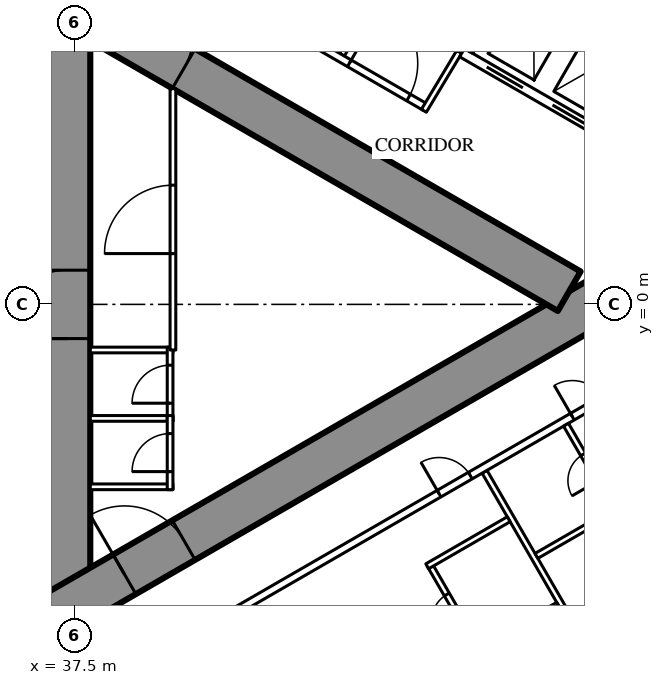
"""IFC4 building model, lengths in metres.
Left out: names, types, materials, properties, quantities, classifications, styles, units other than length and angle.
Written with IfcOpenShell. Run it as: python <this file> out.ifc"""

import sys

from ifc_helpers import new_model, si_unit, direction, frame, frame_2d, origin, place, context, subcontext, project, spatial, rectangle, extrude, element, fill, save


model = new_model("IFC4")
c1 = context("Model", 3, precision=1e-05, world=origin(), true_north=direction((0.0, 1.0)))
c2 = subcontext(c1, "Body", "Model", "MODEL_VIEW")
j1 = project(units=[si_unit("LENGTHUNIT", "METRE"), si_unit("PLANEANGLEUNIT", "RADIAN")], contexts=[c1])
p1 = place(None, origin())
s1 = spatial("IfcSite", under=j1, at=p1, CompositionType="ELEMENT")
p2 = place(p1, origin())
s2 = spatial("IfcBuilding", under=s1, at=p2, CompositionType="ELEMENT")
p3 = place(p2, frame((0.0, 0.0, 163.3)))
s3 = spatial("IfcBuildingStorey", under=s2, at=p3, CompositionType="ELEMENT", Elevation=163.3)
p4 = place(p3, frame((37.3, -8.6, 0.0), z_axis=(0.0, 0.0, 1.0), x_axis=(0.0, 1.0, 0.0)))
e1 = element("IfcWall", 1, at=p4, inside=s3, PredefinedType="SHEAR", context=c2, shape_type="SweptSolid", body=[
    extrude(rectangle(XDim=17.2, YDim=1.2, at=frame_2d((8.6, 0.0))), origin(), (0.0, 0.0, 1.0), 3.5),
])
p5 = place(p4, frame((7.7, 0.0, 0.0)))
e2 = element("IfcOpeningElement", 2, at=p5, cuts=e1, PredefinedType="OPENING", context=c2, shape_type="SweptSolid", body=[
    extrude(rectangle(XDim=1.8, YDim=2.2, at=frame_2d((0.9, 1.1))), frame((0.0, 0.61, 0.0), z_axis=(0.0, -1.0, 0.0), x_axis=(1.0, 0.0, 0.0)), (0.0, 0.0, 1.0), 1.22),
])
p6 = place(p3, frame((27.2, -13.8, 0.0), z_axis=(0.0, 0.0, 1.0), x_axis=(0.866027159892, 0.499996958321, 0.0)))
e3 = element("IfcWall", 3, at=p6, inside=s3, PredefinedType="SHEAR", context=c2, shape_type="SweptSolid", body=[
    extrude(rectangle(XDim=27.947, YDim=1.2, at=frame_2d((13.973, 0.0))), origin(), (0.0, 0.0, 1.0), 3.5),
])
p7 = place(p6, frame((4.6, 0.0, 0.0)))
e4 = element("IfcOpeningElement", 4, at=p7, cuts=e3, PredefinedType="OPENING", context=c2, shape_type="SweptSolid", body=[
    extrude(rectangle(XDim=1.0, YDim=2.2, at=frame_2d((0.5, 1.1))), frame((0.0, 0.61, 0.0), z_axis=(0.0, -1.0, 0.0), x_axis=(1.0, 0.0, 0.0)), (0.0, 0.0, 1.0), 1.22),
])
p8 = place(p6, frame((13.395, 0.0, 0.0)))
e5 = element("IfcOpeningElement", 5, at=p8, cuts=e3, PredefinedType="OPENING", context=c2, shape_type="SweptSolid", body=[
    extrude(rectangle(XDim=1.8, YDim=2.2, at=frame_2d((0.9, 1.1))), frame((0.0, 0.61, 0.0), z_axis=(0.0, -1.0, 0.0), x_axis=(1.0, 0.0, 0.0)), (0.0, 0.0, 1.0), 1.22),
])
p9 = place(p3, frame((27.2, 13.8, 0.0), z_axis=(0.0, 0.0, 1.0), x_axis=(0.866024515034, -0.500001539357, 0.0)))
e6 = element("IfcWall", 6, at=p9, inside=s3, PredefinedType="SHEAR", context=c2, shape_type="SweptSolid", body=[
    extrude(rectangle(XDim=26.907, YDim=1.2, at=frame_2d((13.454, 0.0))), origin(), (0.0, 0.0, 1.0), 3.5),
])
p10 = place(p9, frame((4.6, 0.0, 0.0)))
e7 = element("IfcOpeningElement", 7, at=p10, cuts=e6, PredefinedType="OPENING", context=c2, shape_type="SweptSolid", body=[
    extrude(rectangle(XDim=1.0, YDim=2.2, at=frame_2d((0.5, 1.1))), frame((0.0, 0.61, 0.0), z_axis=(0.0, -1.0, 0.0), x_axis=(1.0, 0.0, 0.0)), (0.0, 0.0, 1.0), 1.22),
])
p11 = place(p9, frame((13.395, 0.0, 0.0)))
e8 = element("IfcOpeningElement", 8, at=p11, cuts=e6, PredefinedType="OPENING", context=c2, shape_type="SweptSolid", body=[
    extrude(rectangle(XDim=1.8, YDim=2.2, at=frame_2d((0.9, 1.1))), frame((0.0, 0.61, 0.0), z_axis=(0.0, -1.0, 0.0), x_axis=(1.0, 0.0, 0.0)), (0.0, 0.0, 1.0), 1.22),
])
p12 = place(p3, frame((48.275, -4.404, 0.0), z_axis=(0.0, 0.0, 1.0), x_axis=(0.500006004368, -0.866021937133, 0.0)))
e9 = element("IfcWall", 9, at=p12, inside=s3, PredefinedType="PARTITIONING", context=c2, shape_type="SweptSolid", body=[
    extrude(rectangle(XDim=7.279, YDim=0.15, at=frame_2d((3.64, 0.0))), origin(), (0.0, 0.0, 1.0), 2.3),
])
p13 = place(p3, frame((44.521, 6.571, 0.0), z_axis=(0.0, 0.0, 1.0), x_axis=(0.500020376429, 0.866013639128, 0.0)))
e10 = element("IfcWall", 10, at=p13, inside=s3, PredefinedType="PARTITIONING", context=c2, shape_type="SweptSolid", body=[
    extrude(rectangle(XDim=7.306, YDim=0.15, at=frame_2d((3.653, 0.0))), origin(), (0.0, 0.0, 1.0), 2.3),
])
p14 = place(p3, frame((27.959, 16.017, 0.0), z_axis=(0.0, 0.0, 1.0), x_axis=(0.866027146794, -0.499996981007, 0.0)))
e11 = element("IfcWall", 11, at=p14, inside=s3, PredefinedType="PARTITIONING", context=c2, shape_type="SweptSolid", body=[
    extrude(rectangle(XDim=21.657, YDim=0.2, at=frame_2d((10.829, 0.0))), origin(), (0.0, 0.0, 1.0), 3.25),
])
p15 = place(p14, frame((15.391, 0.0, 0.0)))
e12 = element("IfcOpeningElement", 12, at=p15, cuts=e11, PredefinedType="OPENING", context=c2, shape_type="SweptSolid", body=[
    extrude(rectangle(XDim=0.95, YDim=2.2, at=frame_2d((0.475, 1.1))), frame((0.0, 0.11, 0.0), z_axis=(0.0, -1.0, 0.0), x_axis=(1.0, 0.0, 0.0)), (0.0, 0.0, 1.0), 0.22),
])
p16 = place(p14, frame((13.409, 0.0, 0.0)))
e13 = element("IfcOpeningElement", 13, at=p16, cuts=e11, PredefinedType="OPENING", context=c2, shape_type="SweptSolid", body=[
    extrude(rectangle(XDim=0.95, YDim=2.2, at=frame_2d((0.475, 1.1))), frame((0.0, 0.11, 0.0), z_axis=(0.0, -1.0, 0.0), x_axis=(1.0, 0.0, 0.0)), (0.0, 0.0, 1.0), 0.22),
])
p17 = place(p14, frame((0.6, 0.0, 0.0)))
e14 = element("IfcOpeningElement", 14, at=p17, cuts=e11, PredefinedType="OPENING", context=c2, shape_type="SweptSolid", body=[
    extrude(rectangle(XDim=0.95, YDim=2.2, at=frame_2d((0.475, 1.1))), frame((0.0, 0.11, 0.0), z_axis=(0.0, -1.0, 0.0), x_axis=(1.0, 0.0, 0.0)), (0.0, 0.0, 1.0), 0.22),
])
p18 = place(p14, frame((19.349, 0.0, 0.0)))
e15 = element("IfcOpeningElement", 15, at=p18, cuts=e11, PredefinedType="OPENING", context=c2, shape_type="SweptSolid", body=[
    extrude(rectangle(XDim=1.8, YDim=2.2, at=frame_2d((0.9, 1.1))), frame((0.0, 0.11, 0.0), z_axis=(0.0, -1.0, 0.0), x_axis=(1.0, 0.0, 0.0)), (0.0, 0.0, 1.0), 0.22),
])
p19 = place(p3, frame((47.606, 6.643, 0.0), z_axis=(0.0, 0.0, 1.0), x_axis=(-0.514237157483, -0.857648031458, 0.0)))
e16 = element("IfcWall", 16, at=p19, inside=s3, PredefinedType="PARTITIONING", context=c2, shape_type="SweptSolid", body=[
    extrude(rectangle(XDim=1.805, YDim=0.15, at=frame_2d((0.902, 0.0))), origin(), (0.0, 0.0, 1.0), 3.25),
])
p20 = place(p3, frame((40.741, -8.638, 0.0), z_axis=(0.0, 0.0, 1.0), x_axis=(0.866022967338, 0.500004220025, 0.0)))
e17 = element("IfcWall", 17, at=p20, inside=s3, PredefinedType="PARTITIONING", context=c2, shape_type="SweptSolid", body=[
    extrude(rectangle(XDim=17.276, YDim=0.2, at=frame_2d((8.638, 0.0))), origin(), (0.0, 0.0, 1.0), 3.25),
])
p21 = place(p20, frame((7.316, 0.0, 0.0)))
e18 = element("IfcOpeningElement", 18, at=p21, cuts=e17, PredefinedType="OPENING", context=c2, shape_type="SweptSolid", body=[
    extrude(rectangle(XDim=0.95, YDim=2.2, at=frame_2d((0.475, 1.1))), frame((0.0, 0.11, 0.0), z_axis=(0.0, -1.0, 0.0), x_axis=(1.0, 0.0, 0.0)), (0.0, 0.0, 1.0), 0.22),
])
p22 = place(p20, frame((11.366, 0.0, 0.0)))
e19 = element("IfcOpeningElement", 19, at=p22, cuts=e17, PredefinedType="OPENING", context=c2, shape_type="SweptSolid", body=[
    extrude(rectangle(XDim=0.95, YDim=2.2, at=frame_2d((0.475, 1.1))), frame((0.0, 0.11, 0.0), z_axis=(0.0, -1.0, 0.0), x_axis=(1.0, 0.0, 0.0)), (0.0, 0.0, 1.0), 0.22),
])
p23 = place(p20, frame((13.347, 0.0, 0.0)))
e20 = element("IfcOpeningElement", 20, at=p23, cuts=e17, PredefinedType="OPENING", context=c2, shape_type="SweptSolid", body=[
    extrude(rectangle(XDim=0.95, YDim=2.2, at=frame_2d((0.475, 1.1))), frame((0.0, 0.11, 0.0), z_axis=(0.0, -1.0, 0.0), x_axis=(1.0, 0.0, 0.0)), (0.0, 0.0, 1.0), 0.22),
])
p24 = place(p3, frame((48.066, -9.143, 0.0), z_axis=(0.0, 0.0, 1.0), x_axis=(0.866006523861, 0.500032699561, 0.0)))
e21 = element("IfcWall", 21, at=p24, inside=s3, PredefinedType="PARTITIONING", context=c2, shape_type="SweptSolid", body=[
    extrude(rectangle(XDim=2.475, YDim=0.15, at=frame_2d((1.237, 0.0))), origin(), (0.0, 0.0, 1.0), 3.25),
])
p25 = place(p3, frame((46.831, -6.854, 0.0), z_axis=(0.0, 0.0, 1.0), x_axis=(0.500006934395, -0.866021400173, 0.0)))
e22 = element("IfcWall", 22, at=p25, inside=s3, PredefinedType="PARTITIONING", context=c2, shape_type="SweptSolid", body=[
    extrude(rectangle(XDim=2.6, YDim=0.15, at=frame_2d((1.3, 0.0))), origin(), (0.0, 0.0, 1.0), 3.25),
])
p26 = place(p25, frame((0.9, 0.0, 0.0)))
e23 = element("IfcOpeningElement", 23, at=p26, cuts=e22, PredefinedType="OPENING", context=c2, shape_type="SweptSolid", body=[
    extrude(rectangle(XDim=0.8, YDim=2.2, at=frame_2d((0.4, 1.1))), frame((0.0, 0.085, 0.0), z_axis=(0.0, -1.0, 0.0), x_axis=(1.0, 0.0, 0.0)), (0.0, 0.0, 1.0), 0.17),
])
for number, where, z_axis, x_axis in (
    (24, (46.766, -6.891, 0.0), (0.0, 0.0, 1.0), (0.866, 0.5, 0.0)),
    (25, (49.64, -6.618, 0.0), (0.0, 0.0, 1.0), (0.866, 0.5, 0.0)),
):
    element("IfcWall", number, at=place(p3, frame(where, z_axis=z_axis, x_axis=x_axis)), inside=s3, PredefinedType="PARTITIONING", context=c2, shape_type="SweptSolid", body=[
        extrude(rectangle(XDim=2.475, YDim=0.15, at=frame_2d((1.237, 0.0))), origin(), (0.0, 0.0, 1.0), 3.25),
    ])
p27 = place(p3, frame((50.418, -3.166, 0.0), z_axis=(0.0, 0.0, 1.0), x_axis=(0.499936506574, -0.866062058628, 0.0)))
e26 = element("IfcWall", 26, at=p27, inside=s3, PredefinedType="PARTITIONING", context=c2, shape_type="SweptSolid", body=[
    extrude(rectangle(XDim=2.6, YDim=0.15, at=frame_2d((1.3, 0.0))), origin(), (0.0, 0.0, 1.0), 3.25),
])
p28 = place(p27, frame((0.9, 0.0, 0.0)))
e27 = element("IfcOpeningElement", 27, at=p28, cuts=e26, PredefinedType="OPENING", context=c2, shape_type="SweptSolid", body=[
    extrude(rectangle(XDim=0.8, YDim=2.2, at=frame_2d((0.4, 1.1))), frame((0.0, 0.085, 0.0), z_axis=(0.0, -1.0, 0.0), x_axis=(1.0, 0.0, 0.0)), (0.0, 0.0, 1.0), 0.17),
])
for number, where, z_axis, x_axis in (
    (28, (37.9, -1.2, 0.0), (0.0, 0.0, 1.0), (1.0, 0.0, 0.0)),
    (29, (37.9, -3.0, 0.0), (0.0, 0.0, 1.0), (1.0, 0.0, 0.0)),
    (30, (37.9, -4.8, 0.0), (0.0, 0.0, 1.0), (1.0, 0.0, 0.0)),
):
    element("IfcWall", number, at=place(p3, frame(where, z_axis=z_axis, x_axis=x_axis)), inside=s3, PredefinedType="PARTITIONING", context=c2, shape_type="SweptSolid", body=[
        extrude(rectangle(XDim=2.175, YDim=0.15, at=frame_2d((1.087, 0.0))), origin(), (0.0, 0.0, 1.0), 3.25),
    ])
p29 = place(p3, frame((40.0, -3.075, 0.0), z_axis=(0.0, 0.0, 1.0), x_axis=(0.0, 1.0, 0.0)))
e31 = element("IfcWall", 31, at=p29, inside=s3, PredefinedType="PARTITIONING", context=c2, shape_type="SweptSolid", body=[
    extrude(rectangle(XDim=1.95, YDim=0.15, at=frame_2d((0.975, 0.0))), origin(), (0.0, 0.0, 1.0), 3.25),
])
p30 = place(p29, frame((0.475, 0.0, 0.0)))
e32 = element("IfcOpeningElement", 32, at=p30, cuts=e31, PredefinedType="OPENING", context=c2, shape_type="SweptSolid", body=[
    extrude(rectangle(XDim=1.0, YDim=2.2, at=frame_2d((0.5, 1.1))), frame((0.0, 0.085, 0.0), z_axis=(0.0, -1.0, 0.0), x_axis=(1.0, 0.0, 0.0)), (0.0, 0.0, 1.0), 0.17),
])
p31 = place(p3, frame((40.0, -4.875, 0.0), z_axis=(0.0, 0.0, 1.0), x_axis=(0.0, 1.0, 0.0)))
e33 = element("IfcWall", 33, at=p31, inside=s3, PredefinedType="PARTITIONING", context=c2, shape_type="SweptSolid", body=[
    extrude(rectangle(XDim=1.95, YDim=0.15, at=frame_2d((0.975, 0.0))), origin(), (0.0, 0.0, 1.0), 3.25),
])
p32 = place(p31, frame((0.475, 0.0, 0.0)))
e34 = element("IfcOpeningElement", 34, at=p32, cuts=e33, PredefinedType="OPENING", context=c2, shape_type="SweptSolid", body=[
    extrude(rectangle(XDim=1.0, YDim=2.2, at=frame_2d((0.5, 1.1))), frame((0.0, 0.085, 0.0), z_axis=(0.0, -1.0, 0.0), x_axis=(1.0, 0.0, 0.0)), (0.0, 0.0, 1.0), 0.17),
])
p33 = place(p3, frame((40.075, -1.2, 0.0), z_axis=(0.0, 0.0, 1.0), x_axis=(0.0, 1.0, 0.0)))
e35 = element("IfcWall", 35, at=p33, inside=s3, PredefinedType="PARTITIONING", context=c2, shape_type="SweptSolid", body=[
    extrude(rectangle(XDim=6.874, YDim=0.15, at=frame_2d((3.437, 0.0))), origin(), (0.0, 0.0, 1.0), 3.25),
])
p34 = place(p33, frame((2.537, 0.0, 0.0)))
e36 = element("IfcOpeningElement", 36, at=p34, cuts=e35, PredefinedType="OPENING", context=c2, shape_type="SweptSolid", body=[
    extrude(rectangle(XDim=1.8, YDim=2.2, at=frame_2d((0.9, 1.1))), frame((0.0, 0.085, 0.0), z_axis=(0.0, -1.0, 0.0), x_axis=(1.0, 0.0, 0.0)), (0.0, 0.0, 1.0), 0.17),
])
p35 = place(p3, frame((47.681, 6.622, 0.0), z_axis=(0.0, 0.0, 1.0), x_axis=(0.86603344179, -0.499986077507, 0.0)))
e37 = element("IfcWall", 37, at=p35, inside=s3, PredefinedType="PARTITIONING", context=c2, shape_type="SweptSolid", body=[
    extrude(rectangle(XDim=6.6, YDim=0.25, at=frame_2d((3.3, 0.0))), origin(), (0.0, 0.0, 1.0), 3.25),
])
p36 = place(p35, frame((0.75, 0.0, 0.0)))
e38 = element("IfcOpeningElement", 38, at=p36, cuts=e37, PredefinedType="OPENING", context=c2, shape_type="SweptSolid", body=[
    extrude(rectangle(XDim=1.1, YDim=2.2, at=frame_2d((0.55, 1.1))), frame((0.0, 0.135, 0.0), z_axis=(0.0, -1.0, 0.0), x_axis=(1.0, 0.0, 0.0)), (0.0, 0.0, 1.0), 0.27),
])
p37 = place(p35, frame((2.75, 0.0, 0.0)))
e39 = element("IfcOpeningElement", 39, at=p37, cuts=e37, PredefinedType="OPENING", context=c2, shape_type="SweptSolid", body=[
    extrude(rectangle(XDim=1.1, YDim=2.2, at=frame_2d((0.55, 1.1))), frame((0.0, 0.135, 0.0), z_axis=(0.0, -1.0, 0.0), x_axis=(1.0, 0.0, 0.0)), (0.0, 0.0, 1.0), 0.27),
])
p38 = place(p35, frame((4.75, 0.0, 0.0)))
e40 = element("IfcOpeningElement", 40, at=p38, cuts=e37, PredefinedType="OPENING", context=c2, shape_type="SweptSolid", body=[
    extrude(rectangle(XDim=1.1, YDim=2.2, at=frame_2d((0.55, 1.1))), frame((0.0, 0.135, 0.0), z_axis=(0.0, -1.0, 0.0), x_axis=(1.0, 0.0, 0.0)), (0.0, 0.0, 1.0), 0.27),
])
p39 = place(p3, frame((49.406, 9.611, 0.0), z_axis=(0.0, 0.0, 1.0), x_axis=(0.86603344179, -0.499986077507, 0.0)))
e41 = element("IfcWall", 41, at=p39, inside=s3, PredefinedType="PARTITIONING", context=c2, shape_type="SweptSolid", body=[
    extrude(rectangle(XDim=6.6, YDim=0.25, at=frame_2d((3.3, 0.0))), origin(), (0.0, 0.0, 1.0), 3.25),
])
p40 = place(p3, frame((47.852, 6.668, 0.0), z_axis=(0.0, 0.0, 1.0), x_axis=(0.499929347863, 0.866066190972, 0.0)))
e42 = element("IfcWall", 42, at=p40, inside=s3, PredefinedType="PARTITIONING", context=c2, shape_type="SweptSolid", body=[
    extrude(rectangle(XDim=3.201, YDim=0.25, at=frame_2d((1.6, 0.0))), origin(), (0.0, 0.0, 1.0), 3.25),
])
p41 = place(p26, origin())
e43 = element("IfcDoor", 43, at=p41, inside=s3, OperationType="SINGLE_SWING_RIGHT", PredefinedType="DOOR", context=c2, shape_type="SweptSolid", body=[
    extrude(rectangle(XDim=0.8, YDim=2.2, at=frame_2d((0.4, 1.1))), frame((0.0, 0.025, 0.0), z_axis=(0.0, -1.0, 0.0), x_axis=(1.0, 0.0, 0.0)), (0.0, 0.0, 1.0), 0.05),
])
fill(e23, e43)
p42 = place(p21, origin())
e44 = element("IfcDoor", 44, at=p42, inside=s3, OperationType="SINGLE_SWING_LEFT", PredefinedType="DOOR", context=c2, shape_type="SweptSolid", body=[
    extrude(rectangle(XDim=0.95, YDim=2.2, at=frame_2d((0.475, 1.1))), frame((0.0, 0.025, 0.0), z_axis=(0.0, -1.0, 0.0), x_axis=(1.0, 0.0, 0.0)), (0.0, 0.0, 1.0), 0.05),
])
fill(e18, e44)
p43 = place(p28, origin())
e45 = element("IfcDoor", 45, at=p43, inside=s3, OperationType="SINGLE_SWING_RIGHT", PredefinedType="DOOR", context=c2, shape_type="SweptSolid", body=[
    extrude(rectangle(XDim=0.8, YDim=2.2, at=frame_2d((0.4, 1.1))), frame((0.0, 0.025, 0.0), z_axis=(0.0, -1.0, 0.0), x_axis=(1.0, 0.0, 0.0)), (0.0, 0.0, 1.0), 0.05),
])
fill(e27, e45)
p44 = place(p22, origin())
e46 = element("IfcDoor", 46, at=p44, inside=s3, OperationType="SINGLE_SWING_LEFT", PredefinedType="DOOR", context=c2, shape_type="SweptSolid", body=[
    extrude(rectangle(XDim=0.95, YDim=2.2, at=frame_2d((0.475, 1.1))), frame((0.0, 0.025, 0.0), z_axis=(0.0, -1.0, 0.0), x_axis=(1.0, 0.0, 0.0)), (0.0, 0.0, 1.0), 0.05),
])
fill(e19, e46)
p45 = place(p18, origin())
e47 = element("IfcDoor", 47, at=p45, inside=s3, OperationType="DOUBLE_DOOR_SINGLE_SWING", PredefinedType="DOOR", context=c2, shape_type="SweptSolid", body=[
    extrude(rectangle(XDim=1.8, YDim=2.2, at=frame_2d((0.9, 1.1))), frame((0.0, 0.025, 0.0), z_axis=(0.0, -1.0, 0.0), x_axis=(1.0, 0.0, 0.0)), (0.0, 0.0, 1.0), 0.05),
])
fill(e15, e47)
p46 = place(p30, origin())
e48 = element("IfcDoor", 48, at=p46, inside=s3, OperationType="SINGLE_SWING_LEFT", PredefinedType="DOOR", context=c2, shape_type="SweptSolid", body=[
    extrude(rectangle(XDim=1.0, YDim=2.2, at=frame_2d((0.5, 1.1))), frame((0.0, 0.025, 0.0), z_axis=(0.0, -1.0, 0.0), x_axis=(1.0, 0.0, 0.0)), (0.0, 0.0, 1.0), 0.05),
])
fill(e32, e48)
p47 = place(p32, origin())
e49 = element("IfcDoor", 49, at=p47, inside=s3, OperationType="SINGLE_SWING_LEFT", PredefinedType="DOOR", context=c2, shape_type="SweptSolid", body=[
    extrude(rectangle(XDim=1.0, YDim=2.2, at=frame_2d((0.5, 1.1))), frame((0.0, 0.025, 0.0), z_axis=(0.0, -1.0, 0.0), x_axis=(1.0, 0.0, 0.0)), (0.0, 0.0, 1.0), 0.05),
])
fill(e34, e49)
p48 = place(p34, origin())
e50 = element("IfcDoor", 50, at=p48, inside=s3, OperationType="DOUBLE_DOOR_SINGLE_SWING", PredefinedType="DOOR", context=c2, shape_type="SweptSolid", body=[
    extrude(rectangle(XDim=1.8, YDim=2.2, at=frame_2d((0.9, 1.1))), frame((0.0, 0.025, 0.0), z_axis=(0.0, -1.0, 0.0), x_axis=(1.0, 0.0, 0.0)), (0.0, 0.0, 1.0), 0.05),
])
fill(e36, e50)
p49 = place(p8, origin())
e51 = element("IfcDoor", 51, at=p49, inside=s3, OperationType="DOUBLE_DOOR_SINGLE_SWING", PredefinedType="DOOR", context=c2, shape_type="SweptSolid", body=[
    extrude(rectangle(XDim=1.8, YDim=2.2, at=frame_2d((0.9, 1.1))), frame((0.0, 0.025, 0.0), z_axis=(0.0, -1.0, 0.0), x_axis=(1.0, 0.0, 0.0)), (0.0, 0.0, 1.0), 0.05),
])
fill(e5, e51)
p50 = place(p11, origin())
e52 = element("IfcDoor", 52, at=p50, inside=s3, OperationType="DOUBLE_DOOR_SINGLE_SWING", PredefinedType="DOOR", context=c2, shape_type="SweptSolid", body=[
    extrude(rectangle(XDim=1.8, YDim=2.2, at=frame_2d((0.9, 1.1))), frame((0.0, 0.025, 0.0), z_axis=(0.0, -1.0, 0.0), x_axis=(1.0, 0.0, 0.0)), (0.0, 0.0, 1.0), 0.05),
])
fill(e8, e52)
p51 = place(p5, origin())
e53 = element("IfcDoor", 53, at=p51, inside=s3, OperationType="DOUBLE_DOOR_SINGLE_SWING", PredefinedType="DOOR", context=c2, shape_type="SweptSolid", body=[
    extrude(rectangle(XDim=1.8, YDim=2.2, at=frame_2d((0.9, 1.1))), frame((0.0, 0.025, 0.0), z_axis=(0.0, -1.0, 0.0), x_axis=(1.0, 0.0, 0.0)), (0.0, 0.0, 1.0), 0.05),
])
fill(e2, e53)
p52 = place(p36, origin())
e54 = element("IfcDoor", 54, at=p52, inside=s3, OperationType="DOUBLE_DOOR_SLIDING", PredefinedType="USERDEFINED", context=c2, shape_type="SweptSolid", body=[
    extrude(rectangle(XDim=1.1, YDim=2.2, at=frame_2d((0.55, 1.1))), frame((0.0, 0.025, 0.0), z_axis=(0.0, -1.0, 0.0), x_axis=(1.0, 0.0, 0.0)), (0.0, 0.0, 1.0), 0.05),
])
fill(e38, e54)
p53 = place(p37, origin())
e55 = element("IfcDoor", 55, at=p53, inside=s3, OperationType="DOUBLE_DOOR_SLIDING", PredefinedType="USERDEFINED", context=c2, shape_type="SweptSolid", body=[
    extrude(rectangle(XDim=1.1, YDim=2.2, at=frame_2d((0.55, 1.1))), frame((0.0, 0.025, 0.0), z_axis=(0.0, -1.0, 0.0), x_axis=(1.0, 0.0, 0.0)), (0.0, 0.0, 1.0), 0.05),
])
fill(e39, e55)
save(model, sys.argv[1])
